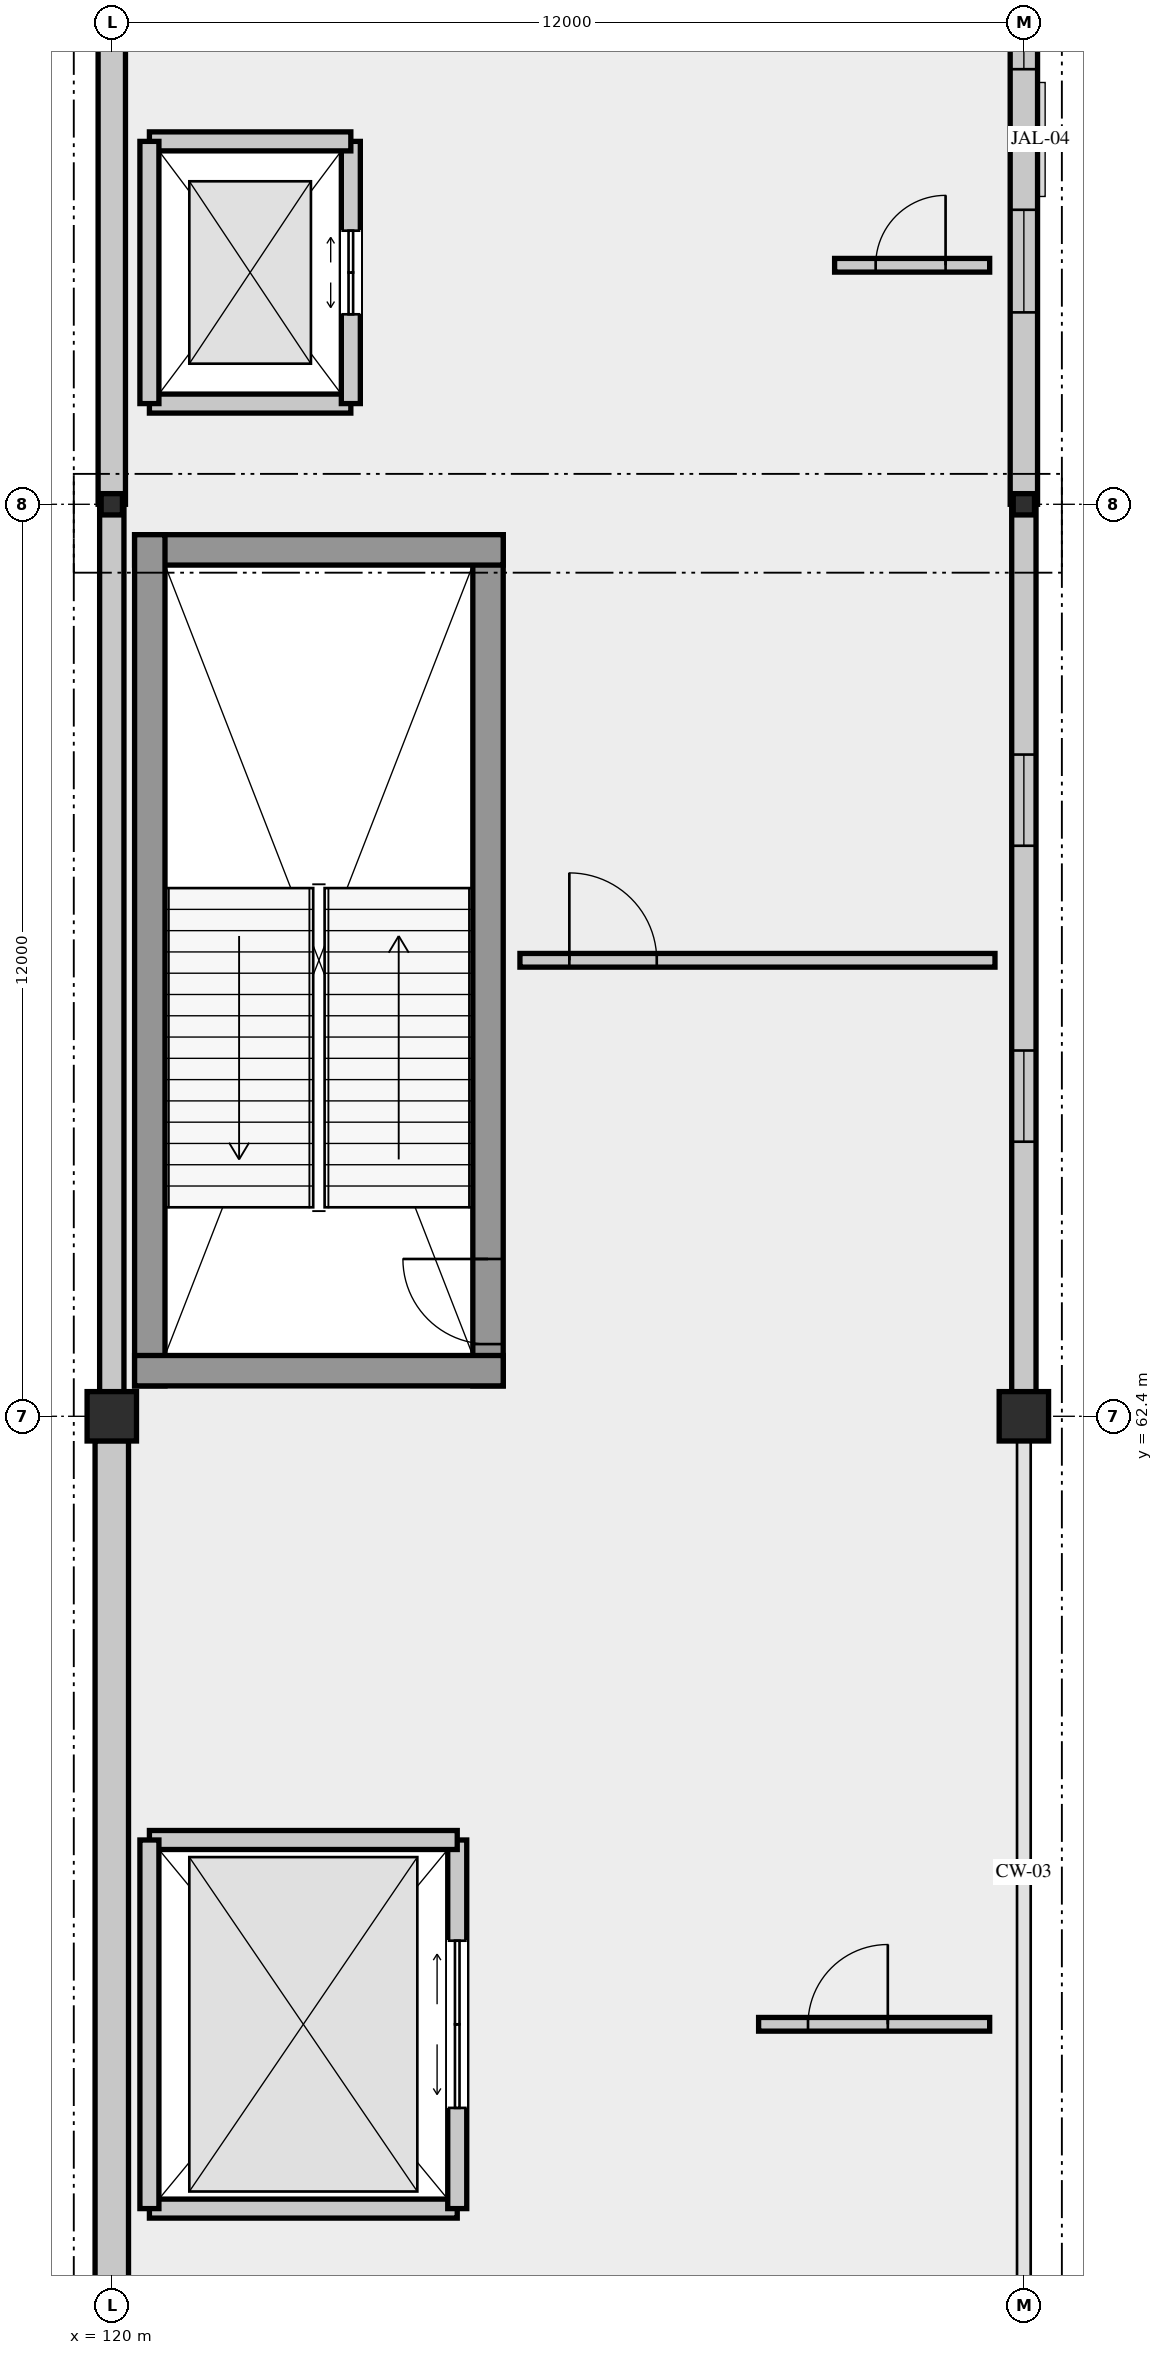
"""IFC4 building model, lengths in metres.
Left out: names, types, materials, properties, quantities, classifications, styles, units other than length and angle.
Written with IfcOpenShell. Run it as: python <this file> out.ifc"""

import sys

from ifc_helpers import new_model, si_unit, direction, frame, frame_2d, origin, origin_2d, place, context, subcontext, project, spatial, rectangle, i_section, extrude, element, fill, save


model = new_model("IFC4")
c1 = context("Model", 3, precision=1e-05, world=origin(), true_north=direction((0.0, 1.0)))
c2 = subcontext(c1, "Body", "Model", "MODEL_VIEW")
j1 = project(units=[si_unit("LENGTHUNIT", "METRE"), si_unit("PLANEANGLEUNIT", "RADIAN")], contexts=[c1])
p1 = place(None, origin())
s1 = spatial("IfcSite", under=j1, at=p1, CompositionType="ELEMENT")
p2 = place(p1, origin())
s2 = spatial("IfcBuilding", under=s1, at=p2, CompositionType="ELEMENT")
p3 = place(p2, frame((0.0, 0.0, 10.8)))
s3 = spatial("IfcBuildingStorey", under=s2, at=p3, CompositionType="ELEMENT", Elevation=10.8)
p4 = place(p3, frame((120.0, 62.4, 0.0), z_axis=(0.0, 0.0, 1.0), x_axis=(1.0, 0.0, 0.0)))
e1 = element("IfcColumn", 1, at=p4, inside=s3, PredefinedType="COLUMN", context=c2, shape_type="SweptSolid", body=[
    extrude(rectangle(XDim=0.65, YDim=0.65, at=origin_2d()), origin(), (0.0, 0.0, 1.0), 6.0),
])
p5 = place(p3, frame((120.0, 74.4, 0.0), z_axis=(0.0, 0.0, 1.0), x_axis=(1.0, 0.0, 0.0)))
e2 = element("IfcColumn", 2, at=p5, inside=s3, PredefinedType="COLUMN", context=c2, shape_type="SweptSolid", body=[
    extrude(i_section(OverallWidth=0.28, OverallDepth=0.28, WebThickness=0.01, FlangeThickness=0.018, FilletRadius=0.024, at=origin_2d()), origin(), (0.0, 0.0, 1.0), 6.0),
])
p6 = place(p3, frame((132.0, 62.4, 0.0), z_axis=(0.0, 0.0, 1.0), x_axis=(1.0, 0.0, 0.0)))
e3 = element("IfcColumn", 3, at=p6, inside=s3, PredefinedType="COLUMN", context=c2, shape_type="SweptSolid", body=[
    extrude(rectangle(XDim=0.65, YDim=0.65, at=origin_2d()), origin(), (0.0, 0.0, 1.0), 6.0),
])
p7 = place(p3, frame((132.0, 74.4, 0.0), z_axis=(0.0, 0.0, 1.0), x_axis=(1.0, 0.0, 0.0)))
e4 = element("IfcColumn", 4, at=p7, inside=s3, PredefinedType="COLUMN", context=c2, shape_type="SweptSolid", body=[
    extrude(i_section(OverallWidth=0.28, OverallDepth=0.28, WebThickness=0.01, FlangeThickness=0.018, FilletRadius=0.024, at=origin_2d()), origin(), (0.0, 0.0, 1.0), 6.0),
])
p8 = place(p3, frame((120.0, 62.08, 0.0), z_axis=(0.0, 0.0, 1.0), x_axis=(0.0, -1.0, 0.0)))
e5 = element("IfcWall", 5, at=p8, inside=s3, PredefinedType="SOLIDWALL", context=c2, shape_type="SweptSolid", body=[
    extrude(rectangle(XDim=11.36, YDim=0.44, at=frame_2d((5.68, 0.0))), origin(), (0.0, 0.0, 1.0), 5.11),
])
p9 = place(p3, frame((120.0, 74.4, 0.0), z_axis=(0.0, 0.0, 1.0), x_axis=(0.0, -1.0, 0.0)))
e6 = element("IfcWall", 6, at=p9, inside=s3, PredefinedType="SOLIDWALL", context=c2, shape_type="SweptSolid", body=[
    extrude(rectangle(XDim=11.68, YDim=0.32, at=frame_2d((5.84, 0.0))), origin(), (0.0, 0.0, 1.0), 5.11),
])
p10 = place(p3, frame((132.0, 62.72, 0.0), z_axis=(0.0, 0.0, 1.0), x_axis=(0.0, 1.0, 0.0)))
e7 = element("IfcWall", 7, at=p10, inside=s3, PredefinedType="SOLIDWALL", context=c2, shape_type="SweptSolid", body=[
    extrude(rectangle(XDim=11.68, YDim=0.32, at=frame_2d((5.84, 0.0))), origin(), (0.0, 0.0, 1.0), 5.11),
])
p11 = place(p10, frame((3.293, 0.0, 0.95)))
e8 = element("IfcOpeningElement", 8, at=p11, cuts=e7, PredefinedType="OPENING", context=c2, shape_type="SweptSolid", body=[
    extrude(rectangle(XDim=1.2, YDim=1.5, at=frame_2d((0.6, 0.75))), frame((0.0, 0.17, 0.0), z_axis=(0.0, -1.0, 0.0), x_axis=(1.0, 0.0, 0.0)), (0.0, 0.0, 1.0), 0.34),
])
p12 = place(p10, frame((7.187, 0.0, 0.95)))
e9 = element("IfcOpeningElement", 9, at=p12, cuts=e7, PredefinedType="OPENING", context=c2, shape_type="SweptSolid", body=[
    extrude(rectangle(XDim=1.2, YDim=1.5, at=frame_2d((0.6, 0.75))), frame((0.0, 0.17, 0.0), z_axis=(0.0, -1.0, 0.0), x_axis=(1.0, 0.0, 0.0)), (0.0, 0.0, 1.0), 0.34),
])
p13 = place(p3, frame((120.0, 84.0, 0.0), z_axis=(0.0, 0.0, 1.0), x_axis=(0.0, -1.0, 0.0)))
e10 = element("IfcWall", 10, at=p13, inside=s3, PredefinedType="SOLIDWALL", context=c2, shape_type="SweptSolid", body=[
    extrude(rectangle(XDim=9.6, YDim=0.36, at=frame_2d((4.8, 0.0))), origin(), (0.0, 0.0, 1.0), 5.11),
])
p14 = place(p3, frame((132.0, 74.4, 0.0), z_axis=(0.0, 0.0, 1.0), x_axis=(0.0, 1.0, 0.0)))
e11 = element("IfcWall", 11, at=p14, inside=s3, PredefinedType="SOLIDWALL", context=c2, shape_type="SweptSolid", body=[
    extrude(rectangle(XDim=9.6, YDim=0.36, at=frame_2d((4.8, 0.0))), origin(), (0.0, 0.0, 1.0), 5.11),
])
p15 = place(p14, frame((2.525, 0.0, 0.95)))
e12 = element("IfcOpeningElement", 12, at=p15, cuts=e11, PredefinedType="OPENING", context=c2, shape_type="SweptSolid", body=[
    extrude(rectangle(XDim=1.35, YDim=1.5, at=frame_2d((0.675, 0.75))), frame((0.0, 0.19, 0.0), z_axis=(0.0, -1.0, 0.0), x_axis=(1.0, 0.0, 0.0)), (0.0, 0.0, 1.0), 0.38),
])
p16 = place(p14, frame((5.725, 0.0, 0.95)))
e13 = element("IfcOpeningElement", 13, at=p16, cuts=e11, PredefinedType="OPENING", context=c2, shape_type="SweptSolid", body=[
    extrude(rectangle(XDim=1.35, YDim=1.5, at=frame_2d((0.675, 0.75))), frame((0.0, 0.19, 0.0), z_axis=(0.0, -1.0, 0.0), x_axis=(1.0, 0.0, 0.0)), (0.0, 0.0, 1.0), 0.38),
])
p17 = place(p3, frame((124.95, 62.8, 0.0), z_axis=(0.0, 0.0, 1.0), x_axis=(0.0, 1.0, 0.0)))
e14 = element("IfcWall", 14, at=p17, inside=s3, PredefinedType="SHEAR", context=c2, shape_type="SweptSolid", body=[
    extrude(rectangle(XDim=11.2, YDim=0.4, at=frame_2d((5.6, 0.0))), origin(), (0.0, 0.0, 1.0), 5.69),
])
p18 = place(p17, frame((0.55, 0.0, 0.0)))
e15 = element("IfcOpeningElement", 15, at=p18, cuts=e14, PredefinedType="OPENING", context=c2, shape_type="SweptSolid", body=[
    extrude(rectangle(XDim=1.12, YDim=2.2, at=frame_2d((0.56, 1.1))), frame((0.0, 0.21, 0.0), z_axis=(0.0, -1.0, 0.0), x_axis=(1.0, 0.0, 0.0)), (0.0, 0.0, 1.0), 0.42),
])
p19 = place(p3, frame((125.15, 73.8, 0.0), z_axis=(0.0, 0.0, 1.0), x_axis=(-1.0, 0.0, 0.0)))
e16 = element("IfcWall", 16, at=p19, inside=s3, PredefinedType="SHEAR", context=c2, shape_type="SweptSolid", body=[
    extrude(rectangle(XDim=4.85, YDim=0.4, at=frame_2d((2.425, 0.0))), origin(), (0.0, 0.0, 1.0), 5.69),
])
p20 = place(p3, frame((120.5, 74.0, 0.0), z_axis=(0.0, 0.0, 1.0), x_axis=(0.0, -1.0, 0.0)))
e17 = element("IfcWall", 17, at=p20, inside=s3, PredefinedType="SHEAR", context=c2, shape_type="SweptSolid", body=[
    extrude(rectangle(XDim=11.2, YDim=0.4, at=frame_2d((5.6, 0.0))), origin(), (0.0, 0.0, 1.0), 5.69),
])
p21 = place(p3, frame((120.3, 63.0, 0.0), z_axis=(0.0, 0.0, 1.0), x_axis=(1.0, 0.0, 0.0)))
e18 = element("IfcWall", 18, at=p21, inside=s3, PredefinedType="SHEAR", context=c2, shape_type="SweptSolid", body=[
    extrude(rectangle(XDim=4.85, YDim=0.4, at=frame_2d((2.425, 0.0))), origin(), (0.0, 0.0, 1.0), 5.69),
])
p22 = place(p3, frame((120.495, 75.725, 0.0), z_axis=(0.0, 0.0, 1.0), x_axis=(1.0, 0.0, 0.0)))
e19 = element("IfcWall", 19, at=p22, inside=s3, PredefinedType="SOLIDWALL", context=c2, shape_type="SweptSolid", body=[
    extrude(rectangle(XDim=2.65, YDim=0.25, at=frame_2d((1.325, 0.0))), origin(), (0.0, 0.0, 1.0), 5.69),
])
p23 = place(p3, frame((123.145, 75.725, 0.0), z_axis=(0.0, 0.0, 1.0), x_axis=(0.0, 1.0, 0.0)))
e20 = element("IfcWall", 20, at=p23, inside=s3, PredefinedType="SOLIDWALL", context=c2, shape_type="SweptSolid", body=[
    extrude(rectangle(XDim=3.45, YDim=0.25, at=frame_2d((1.725, 0.0))), origin(), (0.0, 0.0, 1.0), 5.69),
])
p24 = place(p23, frame((1.175, 0.0, 0.0)))
e21 = element("IfcOpeningElement", 21, at=p24, cuts=e20, PredefinedType="OPENING", context=c2, shape_type="SweptSolid", body=[
    extrude(rectangle(XDim=1.1, YDim=2.2, at=frame_2d((0.55, 1.1))), frame((0.0, 0.135, 0.0), z_axis=(0.0, -1.0, 0.0), x_axis=(1.0, 0.0, 0.0)), (0.0, 0.0, 1.0), 0.27),
])
p25 = place(p3, frame((123.145, 79.175, 0.0), z_axis=(0.0, 0.0, 1.0), x_axis=(-1.0, 0.0, 0.0)))
e22 = element("IfcWall", 22, at=p25, inside=s3, PredefinedType="SOLIDWALL", context=c2, shape_type="SweptSolid", body=[
    extrude(rectangle(XDim=2.65, YDim=0.25, at=frame_2d((1.325, 0.0))), origin(), (0.0, 0.0, 1.0), 5.69),
])
p26 = place(p3, frame((120.495, 79.175, 0.0), z_axis=(0.0, 0.0, 1.0), x_axis=(0.0, -1.0, 0.0)))
e23 = element("IfcWall", 23, at=p26, inside=s3, PredefinedType="SOLIDWALL", context=c2, shape_type="SweptSolid", body=[
    extrude(rectangle(XDim=3.45, YDim=0.25, at=frame_2d((1.725, 0.0))), origin(), (0.0, 0.0, 1.0), 5.69),
])
p27 = place(p3, frame((120.495, 51.975, 0.0), z_axis=(0.0, 0.0, 1.0), x_axis=(1.0, 0.0, 0.0)))
e24 = element("IfcWall", 24, at=p27, inside=s3, PredefinedType="SOLIDWALL", context=c2, shape_type="SweptSolid", body=[
    extrude(rectangle(XDim=4.05, YDim=0.25, at=frame_2d((2.025, 0.0))), origin(), (0.0, 0.0, 1.0), 5.69),
])
p28 = place(p3, frame((124.545, 51.975, 0.0), z_axis=(0.0, 0.0, 1.0), x_axis=(0.0, 1.0, 0.0)))
e25 = element("IfcWall", 25, at=p28, inside=s3, PredefinedType="SOLIDWALL", context=c2, shape_type="SweptSolid", body=[
    extrude(rectangle(XDim=4.85, YDim=0.25, at=frame_2d((2.425, 0.0))), origin(), (0.0, 0.0, 1.0), 5.69),
])
p29 = place(p28, frame((1.325, 0.0, 0.0)))
e26 = element("IfcOpeningElement", 26, at=p29, cuts=e25, PredefinedType="OPENING", context=c2, shape_type="SweptSolid", body=[
    extrude(rectangle(XDim=2.2, YDim=2.65, at=frame_2d((1.1, 1.325))), frame((0.0, 0.135, 0.0), z_axis=(0.0, -1.0, 0.0), x_axis=(1.0, 0.0, 0.0)), (0.0, 0.0, 1.0), 0.27),
])
p30 = place(p3, frame((124.545, 56.825, 0.0), z_axis=(0.0, 0.0, 1.0), x_axis=(-1.0, 0.0, 0.0)))
e27 = element("IfcWall", 27, at=p30, inside=s3, PredefinedType="SOLIDWALL", context=c2, shape_type="SweptSolid", body=[
    extrude(rectangle(XDim=4.05, YDim=0.25, at=frame_2d((2.025, 0.0))), origin(), (0.0, 0.0, 1.0), 5.69),
])
p31 = place(p3, frame((120.495, 56.825, 0.0), z_axis=(0.0, 0.0, 1.0), x_axis=(0.0, -1.0, 0.0)))
e28 = element("IfcWall", 28, at=p31, inside=s3, PredefinedType="SOLIDWALL", context=c2, shape_type="SweptSolid", body=[
    extrude(rectangle(XDim=4.85, YDim=0.25, at=frame_2d((2.425, 0.0))), origin(), (0.0, 0.0, 1.0), 5.69),
])
p32 = place(p3, frame((128.51, 54.4, 0.0), z_axis=(0.0, 0.0, 1.0), x_axis=(1.0, 0.0, 0.0)))
e29 = element("IfcWall", 29, at=p32, inside=s3, PredefinedType="PARTITIONING", context=c2, shape_type="SweptSolid", body=[
    extrude(rectangle(XDim=3.04, YDim=0.18, at=frame_2d((1.52, 0.0))), origin(), (0.0, 0.0, 1.0), 5.27),
])
p33 = place(p32, frame((0.65, 0.0, 0.0)))
e30 = element("IfcOpeningElement", 30, at=p33, cuts=e29, PredefinedType="OPENING", context=c2, shape_type="SweptSolid", body=[
    extrude(rectangle(XDim=1.05, YDim=2.2, at=frame_2d((0.525, 1.1))), frame((0.0, 0.1, 0.0), z_axis=(0.0, -1.0, 0.0), x_axis=(1.0, 0.0, 0.0)), (0.0, 0.0, 1.0), 0.2),
])
p34 = place(p3, frame((125.37, 68.4, 0.0), z_axis=(0.0, 0.0, 1.0), x_axis=(1.0, 0.0, 0.0)))
e31 = element("IfcWall", 31, at=p34, inside=s3, PredefinedType="PARTITIONING", context=c2, shape_type="SweptSolid", body=[
    extrude(rectangle(XDim=6.25, YDim=0.18, at=frame_2d((3.125, 0.0))), origin(), (0.0, 0.0, 1.0), 5.27),
])
p35 = place(p34, frame((0.65, 0.0, 0.0)))
e32 = element("IfcOpeningElement", 32, at=p35, cuts=e31, PredefinedType="OPENING", context=c2, shape_type="SweptSolid", body=[
    extrude(rectangle(XDim=1.15, YDim=2.25, at=frame_2d((0.575, 1.125))), frame((0.0, 0.1, 0.0), z_axis=(0.0, -1.0, 0.0), x_axis=(1.0, 0.0, 0.0)), (0.0, 0.0, 1.0), 0.2),
])
p36 = place(p3, frame((129.51, 77.545, 0.0), z_axis=(0.0, 0.0, 1.0), x_axis=(1.0, 0.0, 0.0)))
e33 = element("IfcWall", 33, at=p36, inside=s3, PredefinedType="PARTITIONING", context=c2, shape_type="SweptSolid", body=[
    extrude(rectangle(XDim=2.04, YDim=0.18, at=frame_2d((1.02, 0.0))), origin(), (0.0, 0.0, 1.0), 5.31),
])
p37 = place(p36, frame((0.54, 0.0, 0.0)))
e34 = element("IfcOpeningElement", 34, at=p37, cuts=e33, PredefinedType="OPENING", context=c2, shape_type="SweptSolid", body=[
    extrude(rectangle(XDim=0.92, YDim=2.15, at=frame_2d((0.46, 1.075))), frame((0.0, 0.1, 0.0), z_axis=(0.0, -1.0, 0.0), x_axis=(1.0, 0.0, 0.0)), (0.0, 0.0, 1.0), 0.2),
])
p38 = place(p11, origin())
e35 = element("IfcWindow", 35, at=p38, inside=s3, PartitioningType="SINGLE_PANEL", PredefinedType="WINDOW", context=c2, shape_type="SweptSolid", body=[
    extrude(rectangle(XDim=1.2, YDim=1.5, at=frame_2d((0.6, 0.75))), frame((0.0, 0.03, 0.0), z_axis=(0.0, -1.0, 0.0), x_axis=(1.0, 0.0, 0.0)), (0.0, 0.0, 1.0), 0.06),
])
fill(e8, e35)
p39 = place(p12, origin())
e36 = element("IfcWindow", 36, at=p39, inside=s3, PartitioningType="SINGLE_PANEL", PredefinedType="WINDOW", context=c2, shape_type="SweptSolid", body=[
    extrude(rectangle(XDim=1.2, YDim=1.5, at=frame_2d((0.6, 0.75))), frame((0.0, 0.03, 0.0), z_axis=(0.0, -1.0, 0.0), x_axis=(1.0, 0.0, 0.0)), (0.0, 0.0, 1.0), 0.06),
])
fill(e9, e36)
p40 = place(p15, origin())
e37 = element("IfcWindow", 37, at=p40, inside=s3, PartitioningType="SINGLE_PANEL", PredefinedType="WINDOW", context=c2, shape_type="SweptSolid", body=[
    extrude(rectangle(XDim=1.35, YDim=1.5, at=frame_2d((0.675, 0.75))), frame((0.0, 0.03, 0.0), z_axis=(0.0, -1.0, 0.0), x_axis=(1.0, 0.0, 0.0)), (0.0, 0.0, 1.0), 0.06),
])
fill(e12, e37)
p41 = place(p16, origin())
e38 = element("IfcWindow", 38, at=p41, inside=s3, PartitioningType="SINGLE_PANEL", PredefinedType="WINDOW", context=c2, shape_type="SweptSolid", body=[
    extrude(rectangle(XDim=1.35, YDim=1.5, at=frame_2d((0.675, 0.75))), frame((0.0, 0.03, 0.0), z_axis=(0.0, -1.0, 0.0), x_axis=(1.0, 0.0, 0.0)), (0.0, 0.0, 1.0), 0.06),
])
fill(e13, e38)
p42 = place(p18, origin())
e39 = element("IfcDoor", 39, at=p42, inside=s3, OperationType="SINGLE_SWING_RIGHT", PredefinedType="DOOR", context=c2, shape_type="SweptSolid", body=[
    extrude(rectangle(XDim=1.12, YDim=2.2, at=frame_2d((0.56, 1.1))), frame((0.0, 0.025, 0.0), z_axis=(0.0, -1.0, 0.0), x_axis=(1.0, 0.0, 0.0)), (0.0, 0.0, 1.0), 0.05),
])
fill(e15, e39)
p43 = place(p24, origin())
e40 = element("IfcDoor", 40, at=p43, inside=s3, OperationType="SLIDING_TO_LEFT", PredefinedType="DOOR", context=c2, shape_type="SweptSolid", body=[
    extrude(rectangle(XDim=1.1, YDim=2.2, at=frame_2d((0.55, 1.1))), frame((0.0, 0.025, 0.0), z_axis=(0.0, -1.0, 0.0), x_axis=(1.0, 0.0, 0.0)), (0.0, 0.0, 1.0), 0.05),
])
fill(e21, e40)
p44 = place(p29, origin())
e41 = element("IfcDoor", 41, at=p44, inside=s3, OperationType="DOUBLE_DOOR_SLIDING", PredefinedType="DOOR", context=c2, shape_type="SweptSolid", body=[
    extrude(rectangle(XDim=2.2, YDim=2.65, at=frame_2d((1.1, 1.325))), frame((0.0, 0.025, 0.0), z_axis=(0.0, -1.0, 0.0), x_axis=(1.0, 0.0, 0.0)), (0.0, 0.0, 1.0), 0.05),
])
fill(e26, e41)
p45 = place(p33, origin())
e42 = element("IfcDoor", 42, at=p45, inside=s3, OperationType="SINGLE_SWING_RIGHT", PredefinedType="DOOR", context=c2, shape_type="SweptSolid", body=[
    extrude(rectangle(XDim=1.05, YDim=2.2, at=frame_2d((0.525, 1.1))), frame((0.0, 0.025, 0.0), z_axis=(0.0, -1.0, 0.0), x_axis=(1.0, 0.0, 0.0)), (0.0, 0.0, 1.0), 0.05),
])
fill(e30, e42)
p46 = place(p35, origin())
e43 = element("IfcDoor", 43, at=p46, inside=s3, OperationType="SINGLE_SWING_LEFT", PredefinedType="DOOR", context=c2, shape_type="SweptSolid", body=[
    extrude(rectangle(XDim=1.15, YDim=2.25, at=frame_2d((0.575, 1.125))), frame((0.0, 0.025, 0.0), z_axis=(0.0, -1.0, 0.0), x_axis=(1.0, 0.0, 0.0)), (0.0, 0.0, 1.0), 0.05),
])
fill(e32, e43)
p47 = place(p37, origin())
e44 = element("IfcDoor", 44, at=p47, inside=s3, OperationType="SINGLE_SWING_RIGHT", PredefinedType="DOOR", context=c2, shape_type="SweptSolid", body=[
    extrude(rectangle(XDim=0.92, YDim=2.15, at=frame_2d((0.46, 1.075))), frame((0.0, 0.025, 0.0), z_axis=(0.0, -1.0, 0.0), x_axis=(1.0, 0.0, 0.0)), (0.0, 0.0, 1.0), 0.05),
])
fill(e34, e44)
save(model, sys.argv[1])
